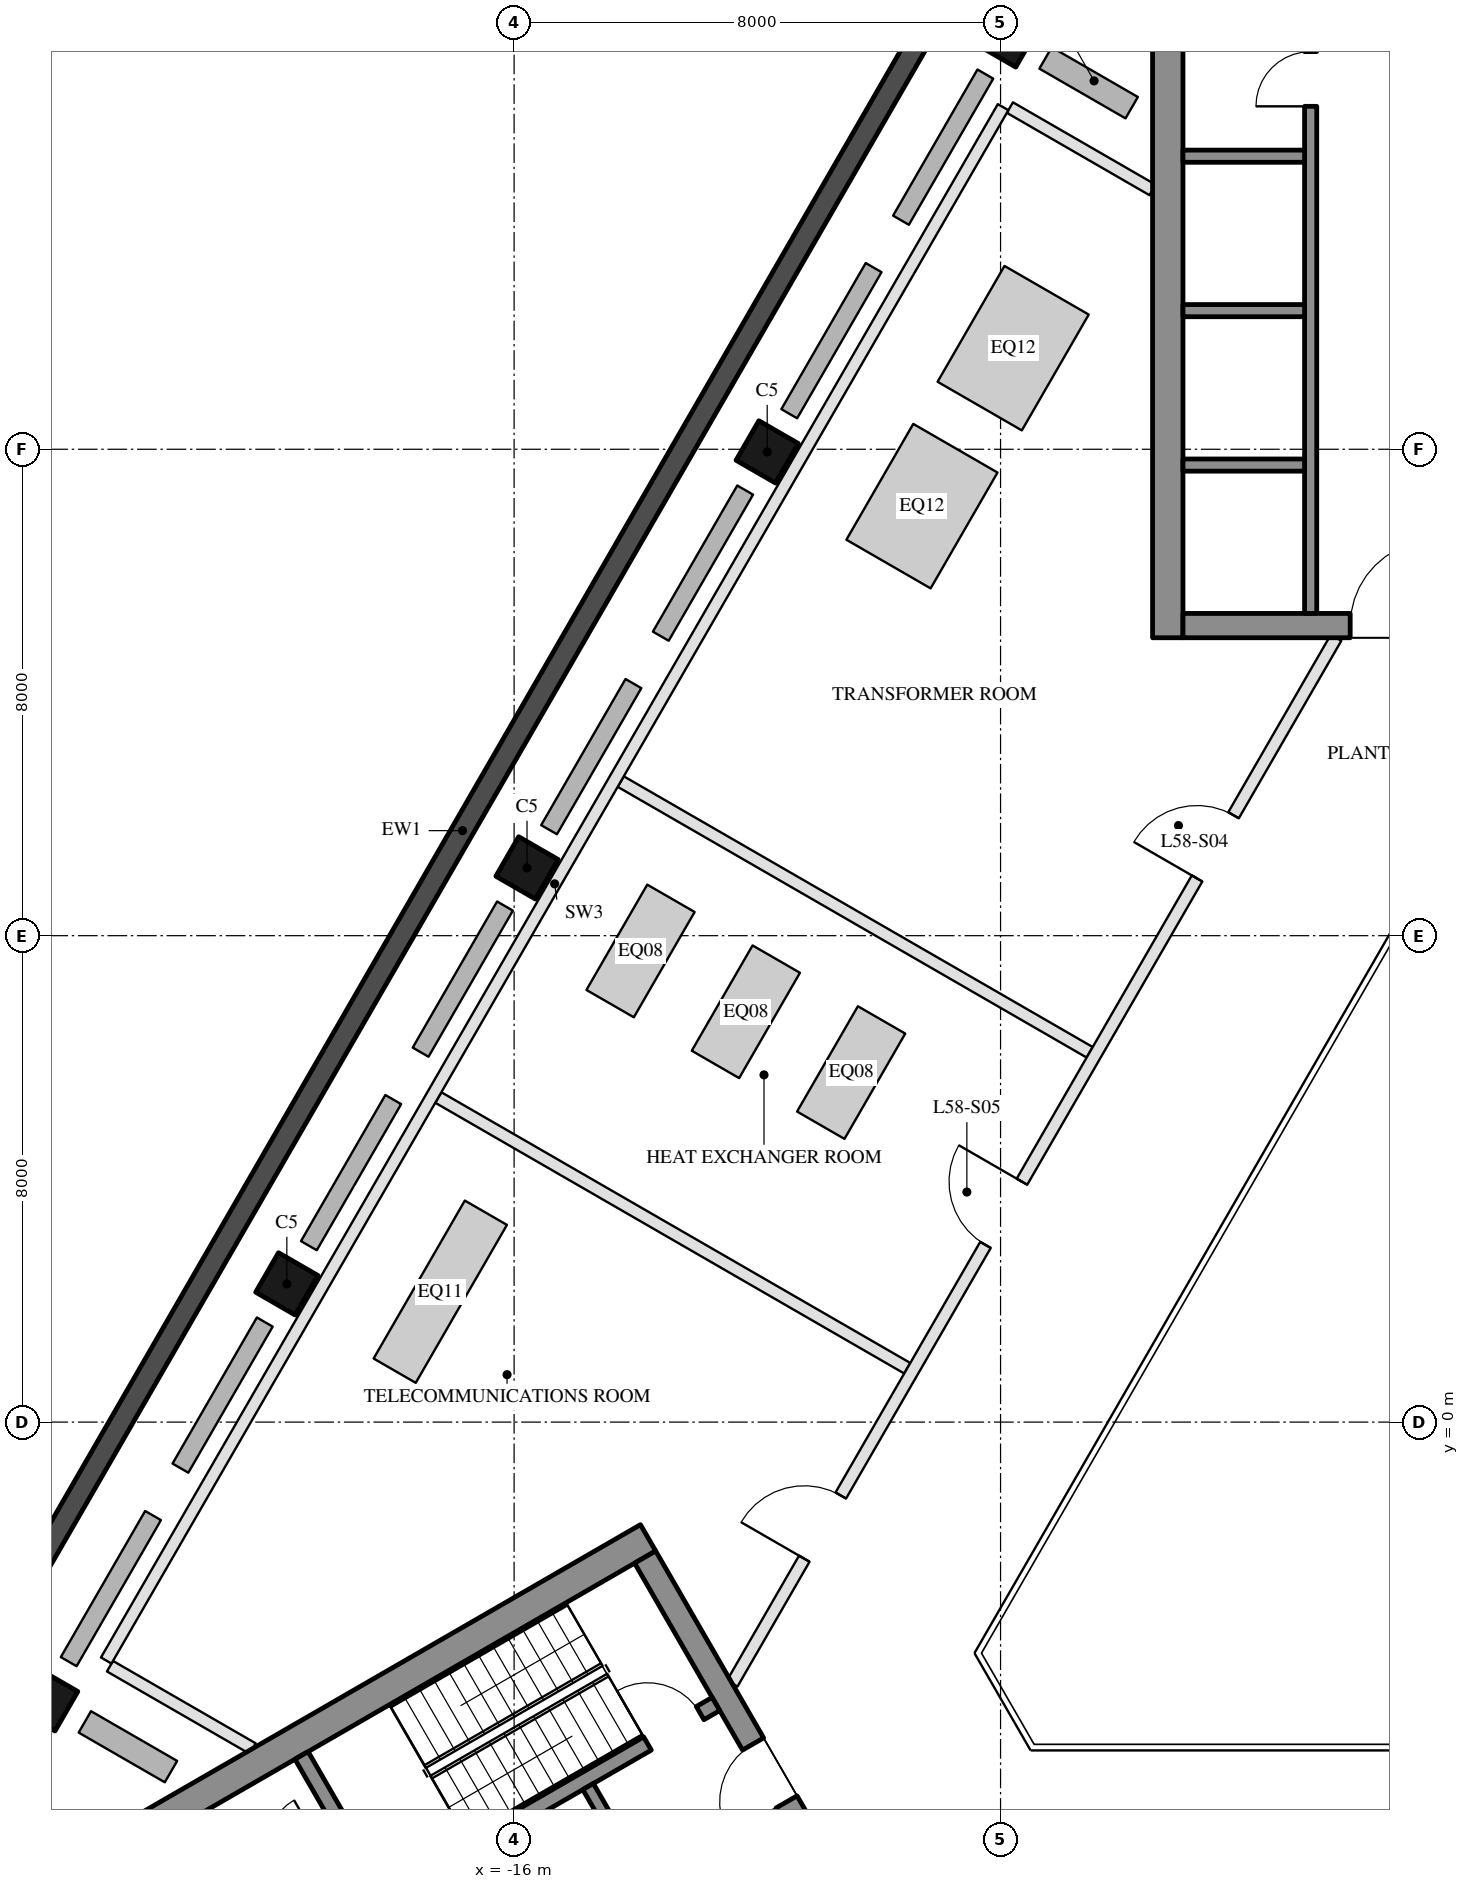
"""IFC4 building model, lengths in metres.
Left out: names, types, materials, properties, quantities, classifications, styles, units other than length and angle.
Written with IfcOpenShell. Run it as: python <this file> out.ifc"""

import sys

from ifc_helpers import new_model, si_unit, direction, frame, frame_2d, origin, origin_2d, place, context, subcontext, project, spatial, rectangle, hollow_rectangle, extrude, element, fill, save


model = new_model("IFC4")
c1 = context("Model", 3, precision=1e-05, world=origin(), true_north=direction((0.0, 1.0)))
c2 = subcontext(c1, "Body", "Model", "MODEL_VIEW")
j1 = project(units=[si_unit("LENGTHUNIT", "METRE"), si_unit("PLANEANGLEUNIT", "RADIAN")], contexts=[c1])
p1 = place(None, origin())
s1 = spatial("IfcSite", under=j1, at=p1, CompositionType="ELEMENT")
p2 = place(p1, origin())
s2 = spatial("IfcBuilding", under=s1, at=p2, CompositionType="ELEMENT")
p3 = place(p2, frame((0.0, 0.0, 237.7)))
s3 = spatial("IfcBuildingStorey", under=s2, at=p3, CompositionType="ELEMENT", Elevation=237.7)
for number, where, z_axis, x_axis in (
    (1, (-7.888, 22.798, 0.0), (0.0, 0.0, 1.0), (0.5, 0.866, 0.0)),
    (2, (-11.838, 15.957, 0.0), (0.0, 0.0, 1.0), (0.5, 0.866, 0.0)),
    (3, (-15.788, 9.115, 0.0), (0.0, 0.0, 1.0), (0.5, 0.866, 0.0)),
    (4, (-19.738, 2.273, 0.0), (0.0, 0.0, 1.0), (0.5, 0.866, 0.0)),
    (5, (-23.688, -4.568, 0.0), (0.0, 0.0, 1.0), (0.5, 0.866, 0.0)),
):
    element("IfcColumn", number, at=place(p3, frame(where, z_axis=z_axis, x_axis=x_axis)), inside=s3, PredefinedType="COLUMN", context=c2, shape_type="SweptSolid", body=[
        extrude(hollow_rectangle(XDim=0.75, YDim=0.75, WallThickness=0.035, at=origin_2d()), origin(), (0.0, 0.0, 1.0), 4.5),
    ])
p4 = place(p3, frame((-7.441, 26.022, 0.0), z_axis=(0.0, 0.0, 1.0), x_axis=(-0.499998380999, -0.866026338513, 0.0)))
e6 = element("IfcWall", 6, at=p4, inside=s3, PredefinedType="SOLIDWALL", context=c2, shape_type="SweptSolid", body=[
    extrude(rectangle(XDim=37.631, YDim=0.35, at=frame_2d((18.816, 0.0))), origin(), (0.0, 0.0, 1.0), 4.2),
])
p5 = place(p3, frame((-5.25, 12.9, 0.0), z_axis=(0.0, 0.0, 1.0), x_axis=(0.0, 1.0, 0.0)))
e7 = element("IfcWall", 7, at=p5, inside=s3, PredefinedType="SHEAR", context=c2, shape_type="SweptSolid", body=[
    extrude(rectangle(XDim=14.837, YDim=0.5, at=frame_2d((7.418, 0.0))), origin(), (0.0, 0.0, 1.0), 4.2),
])
p6 = place(p3, frame((5.0, 13.1, 0.0), z_axis=(0.0, 0.0, 1.0), x_axis=(-1.0, 0.0, 0.0)))
e8 = element("IfcWall", 8, at=p6, inside=s3, PredefinedType="SHEAR", context=c2, shape_type="SweptSolid", body=[
    extrude(rectangle(XDim=10.0, YDim=0.4, at=frame_2d((5.0, 0.0))), origin(), (0.0, 0.0, 1.0), 4.2),
])
p7 = place(p6, frame((3.55, 0.0, 0.0)))
e9 = element("IfcOpeningElement", 9, at=p7, cuts=e8, PredefinedType="OPENING", context=c2, shape_type="SweptSolid", body=[
    extrude(rectangle(XDim=1.1, YDim=2.1, at=frame_2d((0.55, 1.05))), frame((0.0, 0.21, 0.0), z_axis=(0.0, -1.0, 0.0), x_axis=(1.0, 0.0, 0.0)), (0.0, 0.0, 1.0), 0.42),
])
p8 = place(p6, frame((5.85, 0.0, 0.0)))
e10 = element("IfcOpeningElement", 10, at=p8, cuts=e8, PredefinedType="OPENING", context=c2, shape_type="SweptSolid", body=[
    extrude(rectangle(XDim=1.4, YDim=2.1, at=frame_2d((0.7, 1.05))), frame((0.0, 0.21, 0.0), z_axis=(0.0, -1.0, 0.0), x_axis=(1.0, 0.0, 0.0)), (0.0, 0.0, 1.0), 0.42),
])
p9 = place(p3, frame((-2.9, 13.3, 0.0), z_axis=(0.0, 0.0, 1.0), x_axis=(0.0, 1.0, 0.0)))
e11 = element("IfcWall", 11, at=p9, inside=s3, PredefinedType="SHEAR", context=c2, shape_type="SweptSolid", body=[
    extrude(rectangle(XDim=12.6, YDim=0.2, at=frame_2d((6.3, 0.0))), origin(), (0.0, 0.0, 1.0), 4.2),
])
p10 = place(p9, frame((8.34, 0.0, 0.0)))
e12 = element("IfcOpeningElement", 12, at=p10, cuts=e11, PredefinedType="OPENING", context=c2, shape_type="SweptSolid", body=[
    extrude(rectangle(XDim=0.9, YDim=2.1, at=frame_2d((0.45, 1.05))), frame((0.0, 0.11, 0.0), z_axis=(0.0, -1.0, 0.0), x_axis=(1.0, 0.0, 0.0)), (0.0, 0.0, 1.0), 0.22),
])
p11 = place(p9, frame((10.51, 0.0, 0.0)))
e13 = element("IfcOpeningElement", 13, at=p11, cuts=e11, PredefinedType="OPENING", context=c2, shape_type="SweptSolid", body=[
    extrude(rectangle(XDim=0.9, YDim=2.1, at=frame_2d((0.45, 1.05))), frame((0.0, 0.11, 0.0), z_axis=(0.0, -1.0, 0.0), x_axis=(1.0, 0.0, 0.0)), (0.0, 0.0, 1.0), 0.22),
])
for number, where, z_axis, x_axis in (
    (14, (-3.0, 15.74, 0.0), (0.0, 0.0, 1.0), (-1.0, 0.0, 0.0)),
    (15, (-3.0, 18.28, 0.0), (0.0, 0.0, 1.0), (-1.0, 0.0, 0.0)),
    (16, (-3.0, 20.82, 0.0), (0.0, 0.0, 1.0), (-1.0, 0.0, 0.0)),
):
    element("IfcWall", number, at=place(p3, frame(where, z_axis=z_axis, x_axis=x_axis)), inside=s3, PredefinedType="SHEAR", context=c2, shape_type="SweptSolid", body=[
        extrude(rectangle(XDim=2.0, YDim=0.2, at=frame_2d((1.0, 0.0))), origin(), (0.0, 0.0, 1.0), 4.2),
    ])
p12 = place(p3, frame((-13.797, -1.903, 0.0), z_axis=(0.0, 0.0, 1.0), x_axis=(-0.866025009528, -0.500000682871, 0.0)))
e17 = element("IfcWall", 17, at=p12, inside=s3, PredefinedType="SHEAR", context=c2, shape_type="SweptSolid", body=[
    extrude(rectangle(XDim=14.837, YDim=0.5, at=frame_2d((7.418, 0.0))), origin(), (0.0, 0.0, 1.0), 4.2),
])
p13 = place(p3, frame((-13.845, -2.22, 0.0), z_axis=(0.0, 0.0, 1.0), x_axis=(0.500004234368, -0.866022959057, 0.0)))
e18 = element("IfcWall", 18, at=p13, inside=s3, PredefinedType="SHEAR", context=c2, shape_type="SweptSolid", body=[
    extrude(rectangle(XDim=10.0, YDim=0.4, at=frame_2d((5.0, 0.0))), origin(), (0.0, 0.0, 1.0), 4.2),
])
p14 = place(p13, frame((3.55, 0.0, 0.0)))
e19 = element("IfcOpeningElement", 19, at=p14, cuts=e18, PredefinedType="OPENING", context=c2, shape_type="SweptSolid", body=[
    extrude(rectangle(XDim=1.1, YDim=2.1, at=frame_2d((0.55, 1.05))), frame((0.0, 0.21, 0.0), z_axis=(0.0, -1.0, 0.0), x_axis=(1.0, 0.0, 0.0)), (0.0, 0.0, 1.0), 0.42),
])
p15 = place(p13, frame((5.85, 0.0, 0.0)))
e20 = element("IfcOpeningElement", 20, at=p15, cuts=e18, PredefinedType="OPENING", context=c2, shape_type="SweptSolid", body=[
    extrude(rectangle(XDim=1.4, YDim=2.1, at=frame_2d((0.7, 1.05))), frame((0.0, 0.21, 0.0), z_axis=(0.0, -1.0, 0.0), x_axis=(1.0, 0.0, 0.0)), (0.0, 0.0, 1.0), 0.42),
])
p16 = place(p3, frame((-12.681, -4.636, 0.0), z_axis=(0.0, 0.0, 1.0), x_axis=(-0.866021702275, -0.500006411147, 0.0)))
e21 = element("IfcWall", 21, at=p16, inside=s3, PredefinedType="SHEAR", context=c2, shape_type="SweptSolid", body=[
    extrude(rectangle(XDim=6.45, YDim=0.25, at=frame_2d((3.225, 0.0))), origin(), (0.0, 0.0, 1.0), 4.2),
])
p17 = place(p16, frame((0.3, 0.0, 0.0)))
e22 = element("IfcOpeningElement", 22, at=p17, cuts=e21, PredefinedType="OPENING", context=c2, shape_type="SweptSolid", body=[
    extrude(rectangle(XDim=1.0, YDim=2.1, at=frame_2d((0.5, 1.05))), frame((0.0, 0.135, 0.0), z_axis=(0.0, -1.0, 0.0), x_axis=(1.0, 0.0, 0.0)), (0.0, 0.0, 1.0), 0.27),
])
p18 = place(p3, frame((-19.496, -5.482, 0.0), z_axis=(0.0, 0.0, 1.0), x_axis=(0.499990435942, -0.866030925526, 0.0)))
e23 = element("IfcWall", 23, at=p18, inside=s3, PredefinedType="SHEAR", context=c2, shape_type="SweptSolid", body=[
    extrude(rectangle(XDim=2.55, YDim=0.25, at=frame_2d((1.275, 0.0))), origin(), (0.0, 0.0, 1.0), 4.2),
])
p19 = place(p3, frame((-14.783, -5.995, 0.0), z_axis=(0.0, 0.0, 1.0), x_axis=(0.49994636267, -0.866056369097, 0.0)))
e24 = element("IfcWall", 24, at=p19, inside=s3, PredefinedType="SHEAR", context=c2, shape_type="SweptSolid", body=[
    extrude(rectangle(XDim=2.8, YDim=0.2, at=frame_2d((1.4, 0.0))), origin(), (0.0, 0.0, 1.0), 4.2),
])
p20 = place(p19, frame((0.7, 0.0, 0.0)))
e25 = element("IfcOpeningElement", 25, at=p20, cuts=e24, PredefinedType="OPENING", context=c2, shape_type="SweptSolid", body=[
    extrude(rectangle(XDim=1.2, YDim=2.1, at=frame_2d((0.6, 1.05))), frame((0.0, 0.11, 0.0), z_axis=(0.0, -1.0, 0.0), x_axis=(1.0, 0.0, 0.0)), (0.0, 0.0, 1.0), 0.22),
])
p21 = place(p3, frame((-21.076, -6.395, 0.0), z_axis=(0.0, 0.0, 1.0), x_axis=(0.50001468107, -0.866016927499, 0.0)))
e26 = element("IfcWall", 26, at=p21, inside=s3, PredefinedType="PARTITIONING", context=c2, shape_type="SweptSolid", body=[
    extrude(rectangle(XDim=5.4, YDim=0.2, at=frame_2d((2.7, 0.0))), origin(), (0.0, 0.0, 1.0), 4.2),
])
p22 = place(p21, frame((2.163, 0.0, 0.0)))
e27 = element("IfcOpeningElement", 27, at=p22, cuts=e26, PredefinedType="OPENING", context=c2, shape_type="SweptSolid", body=[
    extrude(rectangle(XDim=0.9, YDim=2.1, at=frame_2d((0.45, 1.05))), frame((0.0, 0.11, 0.0), z_axis=(0.0, -1.0, 0.0), x_axis=(1.0, 0.0, 0.0)), (0.0, 0.0, 1.0), 0.22),
])
p23 = place(p21, frame((4.038, 0.0, 0.0)))
e28 = element("IfcOpeningElement", 28, at=p23, cuts=e26, PredefinedType="OPENING", context=c2, shape_type="SweptSolid", body=[
    extrude(rectangle(XDim=0.9, YDim=2.1, at=frame_2d((0.45, 1.05))), frame((0.0, 0.11, 0.0), z_axis=(0.0, -1.0, 0.0), x_axis=(1.0, 0.0, 0.0)), (0.0, 0.0, 1.0), 0.22),
])
p24 = place(p3, frame((-7.846, 21.62, 0.0), z_axis=(0.0, 0.0, 1.0), x_axis=(0.866022026288, -0.50000584995, 0.0)))
e29 = element("IfcWall", 29, at=p24, inside=s3, PredefinedType="PARTITIONING", context=c2, shape_type="SweptSolid", body=[
    extrude(rectangle(XDim=2.709, YDim=0.2, at=frame_2d((1.355, 0.0))), origin(), (0.0, 0.0, 1.0), 4.2),
])
p25 = place(p3, frame((-14.246, 10.535, 0.0), z_axis=(0.0, 0.0, 1.0), x_axis=(0.866017572094, -0.50001356464, 0.0)))
e30 = element("IfcWall", 30, at=p25, inside=s3, PredefinedType="PARTITIONING", context=c2, shape_type="SweptSolid", body=[
    extrude(rectangle(XDim=8.905, YDim=0.2, at=frame_2d((4.453, 0.0))), origin(), (0.0, 0.0, 1.0), 4.2),
])
p26 = place(p3, frame((-17.246, 5.338, 0.0), z_axis=(0.0, 0.0, 1.0), x_axis=(0.866029443717, -0.499993002566, 0.0)))
e31 = element("IfcWall", 31, at=p26, inside=s3, PredefinedType="PARTITIONING", context=c2, shape_type="SweptSolid", body=[
    extrude(rectangle(XDim=8.905, YDim=0.2, at=frame_2d((4.453, 0.0))), origin(), (0.0, 0.0, 1.0), 3.41),
])
p27 = place(p3, frame((-22.646, -4.015, 0.0), z_axis=(0.0, 0.0, 1.0), x_axis=(0.866044551023, -0.499966834543, 0.0)))
e32 = element("IfcWall", 32, at=p27, inside=s3, PredefinedType="PARTITIONING", context=c2, shape_type="SweptSolid", body=[
    extrude(rectangle(XDim=2.71, YDim=0.2, at=frame_2d((1.355, 0.0))), origin(), (0.0, 0.0, 1.0), 4.2),
])
p28 = place(p3, frame((-7.958, 21.626, 0.0), z_axis=(0.0, 0.0, 1.0), x_axis=(-0.499998500593, -0.866026269466, 0.0)))
e33 = element("IfcWall", 33, at=p28, inside=s3, PredefinedType="PARTITIONING", context=c2, shape_type="SweptSolid", body=[
    extrude(rectangle(XDim=29.5, YDim=0.2, at=frame_2d((14.75, 0.0))), origin(), (0.0, 0.0, 1.0), 3.41),
])
p29 = place(p3, frame((-2.482, 12.9, 0.0), z_axis=(0.0, 0.0, 1.0), x_axis=(-0.50000478328, -0.866022642139, 0.0)))
e34 = element("IfcWall", 34, at=p29, inside=s3, PredefinedType="PARTITIONING", context=c2, shape_type="SweptSolid", body=[
    extrude(rectangle(XDim=19.861, YDim=0.2, at=frame_2d((9.931, 0.0))), origin(), (0.0, 0.0, 1.0), 3.41),
])
p30 = place(p29, frame((3.371, 0.0, 0.0)))
e35 = element("IfcOpeningElement", 35, at=p30, cuts=e34, PredefinedType="OPENING", context=c2, shape_type="SweptSolid", body=[
    extrude(rectangle(XDim=1.2, YDim=2.1, at=frame_2d((0.6, 1.05))), frame((0.0, 0.11, 0.0), z_axis=(0.0, -1.0, 0.0), x_axis=(1.0, 0.0, 0.0)), (0.0, 0.0, 1.0), 0.22),
])
p31 = place(p29, frame((10.331, 0.0, 0.0)))
e36 = element("IfcOpeningElement", 36, at=p31, cuts=e34, PredefinedType="OPENING", context=c2, shape_type="SweptSolid", body=[
    extrude(rectangle(XDim=1.2, YDim=2.1, at=frame_2d((0.6, 1.05))), frame((0.0, 0.11, 0.0), z_axis=(0.0, -1.0, 0.0), x_axis=(1.0, 0.0, 0.0)), (0.0, 0.0, 1.0), 0.22),
])
p32 = place(p29, frame((16.29, 0.0, 0.0)))
e37 = element("IfcOpeningElement", 37, at=p32, cuts=e34, PredefinedType="OPENING", context=c2, shape_type="SweptSolid", body=[
    extrude(rectangle(XDim=1.2, YDim=2.1, at=frame_2d((0.6, 1.05))), frame((0.0, 0.11, 0.0), z_axis=(0.0, -1.0, 0.0), x_axis=(1.0, 0.0, 0.0)), (0.0, 0.0, 1.0), 0.22),
])
p33 = place(p10, origin())
e38 = element("IfcDoor", 38, at=p33, inside=s3, OperationType="SINGLE_SWING_LEFT", PredefinedType="DOOR", context=c2, shape_type="SweptSolid", body=[
    extrude(rectangle(XDim=0.9, YDim=2.1, at=frame_2d((0.45, 1.05))), frame((0.0, 0.025, 0.0), z_axis=(0.0, -1.0, 0.0), x_axis=(1.0, 0.0, 0.0)), (0.0, 0.0, 1.0), 0.05),
])
fill(e12, e38)
p34 = place(p8, frame((1.4, 0.0, 0.0), z_axis=(0.0, 0.0, 1.0), x_axis=(-1.0, 0.0, 0.0)))
e39 = element("IfcDoor", 39, at=p34, inside=s3, OperationType="DOUBLE_DOOR_SINGLE_SWING", PredefinedType="DOOR", context=c2, shape_type="SweptSolid", body=[
    extrude(rectangle(XDim=1.4, YDim=2.1, at=frame_2d((0.7, 1.05))), frame((0.0, 0.025, 0.0), z_axis=(0.0, -1.0, 0.0), x_axis=(1.0, 0.0, 0.0)), (0.0, 0.0, 1.0), 0.05),
])
fill(e10, e39)
p35 = place(p14, frame((1.1, 0.0, 0.0), z_axis=(0.0, 0.0, 1.0), x_axis=(-1.0, 0.0, 0.0)))
e40 = element("IfcDoor", 40, at=p35, inside=s3, OperationType="SINGLE_SWING_LEFT", PredefinedType="DOOR", context=c2, shape_type="SweptSolid", body=[
    extrude(rectangle(XDim=1.1, YDim=2.1, at=frame_2d((0.55, 1.05))), frame((0.0, 0.025, 0.0), z_axis=(0.0, -1.0, 0.0), x_axis=(1.0, 0.0, 0.0)), (0.0, 0.0, 1.0), 0.05),
])
fill(e19, e40)
p36 = place(p17, frame((1.0, 0.0, 0.0), z_axis=(0.0, 0.0, 1.0), x_axis=(-1.0, 0.0, 0.0)))
e41 = element("IfcDoor", 41, at=p36, inside=s3, OperationType="SINGLE_SWING_LEFT", PredefinedType="DOOR", context=c2, shape_type="SweptSolid", body=[
    extrude(rectangle(XDim=1.0, YDim=2.1, at=frame_2d((0.5, 1.05))), frame((0.0, 0.025, 0.0), z_axis=(0.0, -1.0, 0.0), x_axis=(1.0, 0.0, 0.0)), (0.0, 0.0, 1.0), 0.05),
])
fill(e22, e41)
p37 = place(p30, frame((1.2, 0.0, 0.0), z_axis=(0.0, 0.0, 1.0), x_axis=(-1.0, 0.0, 0.0)))
e42 = element("IfcDoor", 42, at=p37, inside=s3, OperationType="SINGLE_SWING_LEFT", PredefinedType="DOOR", context=c2, shape_type="SweptSolid", body=[
    extrude(rectangle(XDim=1.2, YDim=2.1, at=frame_2d((0.6, 1.05))), frame((0.0, 0.025, 0.0), z_axis=(0.0, -1.0, 0.0), x_axis=(1.0, 0.0, 0.0)), (0.0, 0.0, 1.0), 0.05),
])
fill(e35, e42)
p38 = place(p31, frame((1.2, 0.0, 0.0), z_axis=(0.0, 0.0, 1.0), x_axis=(-1.0, 0.0, 0.0)))
e43 = element("IfcDoor", 43, at=p38, inside=s3, OperationType="SINGLE_SWING_RIGHT", PredefinedType="DOOR", context=c2, shape_type="SweptSolid", body=[
    extrude(rectangle(XDim=1.2, YDim=2.1, at=frame_2d((0.6, 1.05))), frame((0.0, 0.025, 0.0), z_axis=(0.0, -1.0, 0.0), x_axis=(1.0, 0.0, 0.0)), (0.0, 0.0, 1.0), 0.05),
])
fill(e36, e43)
p39 = place(p32, frame((1.2, 0.0, 0.0), z_axis=(0.0, 0.0, 1.0), x_axis=(-1.0, 0.0, 0.0)))
e44 = element("IfcDoor", 44, at=p39, inside=s3, OperationType="SINGLE_SWING_LEFT", PredefinedType="DOOR", context=c2, shape_type="SweptSolid", body=[
    extrude(rectangle(XDim=1.2, YDim=2.1, at=frame_2d((0.6, 1.05))), frame((0.0, 0.025, 0.0), z_axis=(0.0, -1.0, 0.0), x_axis=(1.0, 0.0, 0.0)), (0.0, 0.0, 1.0), 0.05),
])
fill(e37, e44)
save(model, sys.argv[1])
